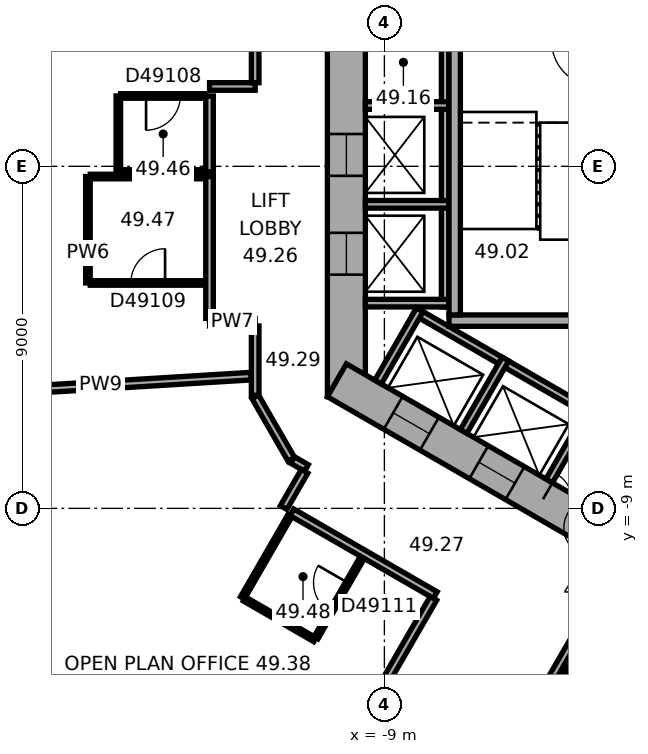
"""IFC4 building model, lengths in metres.
Left out: names, types, materials, properties, quantities, classifications, styles, units other than length and angle.
Written with IfcOpenShell. Run it as: python <this file> out.ifc"""

import sys

from ifc_helpers import new_model, si_unit, direction, frame, frame_2d, origin, place, context, subcontext, project, spatial, rectangle, extrude, element, fill, save


model = new_model("IFC4")
c1 = context("Model", 3, precision=1e-05, world=origin(), true_north=direction((0.0, 1.0)))
c2 = subcontext(c1, "Body", "Model", "MODEL_VIEW")
j1 = project(units=[si_unit("LENGTHUNIT", "METRE"), si_unit("PLANEANGLEUNIT", "RADIAN")], contexts=[c1])
p1 = place(None, origin())
s1 = spatial("IfcSite", under=j1, at=p1, CompositionType="ELEMENT")
p2 = place(p1, origin())
s2 = spatial("IfcBuilding", under=s1, at=p2, CompositionType="ELEMENT")
p3 = place(p2, frame((0.0, 0.0, 198.4)))
s3 = spatial("IfcBuildingStorey", under=s2, at=p3, CompositionType="ELEMENT", Elevation=198.4)
p4 = place(p3, frame((-10.0, 6.062, 0.0), z_axis=(0.0, 0.0, 1.0), x_axis=(0.0, -1.0, 0.0)))
e1 = element("IfcWall", 1, at=p4, inside=s3, PredefinedType="SHEAR", context=c2, shape_type="SweptSolid", body=[
    extrude(rectangle(XDim=12.125, YDim=1.0, at=frame_2d((6.062, 0.0))), origin(), (0.0, 0.0, 1.0), 3.7),
])
p5 = place(p4, frame((5.212, 0.0, 0.0)))
e2 = element("IfcOpeningElement", 2, at=p5, cuts=e1, PredefinedType="OPENING", context=c2, shape_type="SweptSolid", body=[
    extrude(rectangle(XDim=1.1, YDim=2.1, at=frame_2d((0.55, 1.05))), frame((0.0, 0.51, 0.0), z_axis=(0.0, -1.0, 0.0), x_axis=(1.0, 0.0, 0.0)), (0.0, 0.0, 1.0), 1.02),
])
p6 = place(p4, frame((7.812, 0.0, 0.0)))
e3 = element("IfcOpeningElement", 3, at=p6, cuts=e1, PredefinedType="OPENING", context=c2, shape_type="SweptSolid", body=[
    extrude(rectangle(XDim=1.1, YDim=2.1, at=frame_2d((0.55, 1.05))), frame((0.0, 0.51, 0.0), z_axis=(0.0, -1.0, 0.0), x_axis=(1.0, 0.0, 0.0)), (0.0, 0.0, 1.0), 1.02),
])
p7 = place(p3, frame((-10.25, -5.629, 0.0), z_axis=(0.0, 0.0, 1.0), x_axis=(0.866022616891, -0.50000482701, 0.0)))
e4 = element("IfcWall", 4, at=p7, inside=s3, PredefinedType="SHEAR", context=c2, shape_type="SweptSolid", body=[
    extrude(rectangle(XDim=12.125, YDim=1.0, at=frame_2d((6.062, 0.0))), origin(), (0.0, 0.0, 1.0), 3.7),
])
p8 = place(p7, frame((6.262, 0.0, 0.0)))
e5 = element("IfcOpeningElement", 5, at=p8, cuts=e4, PredefinedType="OPENING", context=c2, shape_type="SweptSolid", body=[
    extrude(rectangle(XDim=1.5, YDim=2.1, at=frame_2d((0.75, 1.05))), frame((0.0, 0.51, 0.0), z_axis=(0.0, -1.0, 0.0), x_axis=(1.0, 0.0, 0.0)), (0.0, 0.0, 1.0), 1.02),
])
p9 = place(p7, frame((1.712, 0.0, 0.0)))
e6 = element("IfcOpeningElement", 6, at=p9, cuts=e4, PredefinedType="OPENING", context=c2, shape_type="SweptSolid", body=[
    extrude(rectangle(XDim=1.1, YDim=2.1, at=frame_2d((0.55, 1.05))), frame((0.0, 0.51, 0.0), z_axis=(0.0, -1.0, 0.0), x_axis=(1.0, 0.0, 0.0)), (0.0, 0.0, 1.0), 1.02),
])
p10 = place(p7, frame((4.312, 0.0, 0.0)))
e7 = element("IfcOpeningElement", 7, at=p10, cuts=e4, PredefinedType="OPENING", context=c2, shape_type="SweptSolid", body=[
    extrude(rectangle(XDim=1.1, YDim=2.1, at=frame_2d((0.55, 1.05))), frame((0.0, 0.51, 0.0), z_axis=(0.0, -1.0, 0.0), x_axis=(1.0, 0.0, 0.0)), (0.0, 0.0, 1.0), 1.02),
])
p11 = place(p3, frame((-7.4, 4.3, 0.0), z_axis=(0.0, 0.0, 1.0), x_axis=(0.0, -1.0, 0.0)))
e8 = element("IfcWall", 8, at=p11, inside=s3, PredefinedType="PARTITIONING", context=c2, shape_type="SweptSolid", body=[
    extrude(rectangle(XDim=8.0, YDim=0.2, at=frame_2d((4.0, 0.0))), origin(), (0.0, 0.0, 1.0), 3.42),
])
for number, where, z_axis, x_axis in (
    (9, (-7.3, 1.6, 0.0), (0.0, 0.0, 1.0), (-1.0, 0.0, 0.0)),
    (10, (-7.3, -1.0, 0.0), (0.0, 0.0, 1.0), (-1.0, 0.0, 0.0)),
    (11, (-7.3, -3.6, 0.0), (0.0, 0.0, 1.0), (-1.0, 0.0, 0.0)),
):
    element("IfcWall", number, at=place(p3, frame(where, z_axis=z_axis, x_axis=x_axis)), inside=s3, PredefinedType="PARTITIONING", context=c2, shape_type="SweptSolid", body=[
        extrude(rectangle(XDim=2.2, YDim=0.2, at=frame_2d((1.1, 0.0))), origin(), (0.0, 0.0, 1.0), 3.42),
    ])
p12 = place(p3, frame((-8.203, -3.809, 0.0), z_axis=(0.0, 0.0, 1.0), x_axis=(0.866028230842, -0.499995103361, 0.0)))
e12 = element("IfcWall", 12, at=p12, inside=s3, PredefinedType="PARTITIONING", context=c2, shape_type="SweptSolid", body=[
    extrude(rectangle(XDim=5.4, YDim=0.2, at=frame_2d((2.7, 0.0))), origin(), (0.0, 0.0, 1.0), 3.42),
])
for number, where, z_axis, x_axis in (
    (13, (-8.067, -3.772, 0.0), (0.0, 0.0, 1.0), (-0.5, -0.866, 0.0)),
    (14, (-5.815, -5.072, 0.0), (0.0, 0.0, 1.0), (-0.5, -0.866, 0.0)),
):
    element("IfcWall", number, at=place(p3, frame(where, z_axis=z_axis, x_axis=x_axis)), inside=s3, PredefinedType="PARTITIONING", context=c2, shape_type="SweptSolid", body=[
        extrude(rectangle(XDim=2.2, YDim=0.2, at=frame_2d((1.1, 0.0))), origin(), (0.0, 0.0, 1.0), 3.42),
    ])
p13 = place(p3, frame((-3.563, -6.372, 0.0), z_axis=(0.0, 0.0, 1.0), x_axis=(-0.499994660107, -0.866028486751, 0.0)))
e15 = element("IfcWall", 15, at=p13, inside=s3, PredefinedType="PARTITIONING", context=c2, shape_type="SweptSolid", body=[
    extrude(rectangle(XDim=2.2, YDim=0.2, at=frame_2d((1.1, 0.0))), origin(), (0.0, 0.0, 1.0), 3.42),
])
p14 = place(p3, frame((-2.6, -4.06, 0.0), z_axis=(0.0, 0.0, 1.0), x_axis=(-1.0, 0.0, 0.0)))
e16 = element("IfcWall", 16, at=p14, inside=s3, PredefinedType="SHEAR", context=c2, shape_type="SweptSolid", body=[
    extrude(rectangle(XDim=4.7, YDim=0.3, at=frame_2d((2.35, 0.0))), origin(), (0.0, 0.0, 1.0), 3.42),
])
p15 = place(p3, frame((-7.15, 3.15, 0.0), z_axis=(0.0, 0.0, 1.0), x_axis=(0.0, -1.0, 0.0)))
e17 = element("IfcWall", 17, at=p15, inside=s3, PredefinedType="SHEAR", context=c2, shape_type="SweptSolid", body=[
    extrude(rectangle(XDim=7.06, YDim=0.3, at=frame_2d((3.53, 0.0))), origin(), (0.0, 0.0, 1.0), 3.42),
])
p16 = place(p3, frame((-20.421, -6.005, 0.0), z_axis=(0.0, 0.0, 1.0), x_axis=(0.998134865741, 0.061047438866, 0.0)))
e18 = element("IfcWall", 18, at=p16, inside=s3, PredefinedType="PARTITIONING", context=c2, shape_type="SweptSolid", body=[
    extrude(rectangle(XDim=7.927, YDim=0.2, at=frame_2d((3.963, 0.0))), origin(), (0.0, 0.0, 1.0), 2.87),
])
p17 = place(p3, frame((-16.801, -3.069, 0.0), z_axis=(0.0, 0.0, 1.0), x_axis=(0.0, 1.0, 0.0)))
e19 = element("IfcWall", 19, at=p17, inside=s3, PredefinedType="PARTITIONING", context=c2, shape_type="SweptSolid", body=[
    extrude(rectangle(XDim=2.8, YDim=0.12, at=frame_2d((1.4, 0.0))), origin(), (0.0, 0.0, 1.0), 3.42),
])
p18 = place(p3, frame((-16.741, -0.269, 0.0), z_axis=(0.0, 0.0, 1.0), x_axis=(1.0, 0.0, 0.0)))
e20 = element("IfcWall", 20, at=p18, inside=s3, PredefinedType="PARTITIONING", context=c2, shape_type="SweptSolid", body=[
    extrude(rectangle(XDim=3.04, YDim=0.12, at=frame_2d((1.52, 0.0))), origin(), (0.0, 0.0, 1.0), 3.42),
])
p19 = place(p3, frame((-16.001, -0.149, 0.0), z_axis=(0.0, 0.0, 1.0), x_axis=(0.0, 1.0, 0.0)))
e21 = element("IfcWall", 21, at=p19, inside=s3, PredefinedType="PARTITIONING", context=c2, shape_type="SweptSolid", body=[
    extrude(rectangle(XDim=2.0, YDim=0.12, at=frame_2d((1.0, 0.0))), origin(), (0.0, 0.0, 1.0), 3.42),
])
p20 = place(p3, frame((-15.941, 1.851, 0.0), z_axis=(0.0, 0.0, 1.0), x_axis=(1.0, 0.0, 0.0)))
e22 = element("IfcWall", 22, at=p20, inside=s3, PredefinedType="PARTITIONING", context=c2, shape_type="SweptSolid", body=[
    extrude(rectangle(XDim=2.24, YDim=0.12, at=frame_2d((1.12, 0.0))), origin(), (0.0, 0.0, 1.0), 3.42),
])
p21 = place(p20, frame((0.67, 0.0, 0.0)))
e23 = element("IfcOpeningElement", 23, at=p21, cuts=e22, PredefinedType="OPENING", context=c2, shape_type="SweptSolid", body=[
    extrude(rectangle(XDim=0.9, YDim=2.1, at=frame_2d((0.45, 1.05))), frame((0.0, 0.07, 0.0), z_axis=(0.0, -1.0, 0.0), x_axis=(1.0, 0.0, 0.0)), (0.0, 0.0, 1.0), 0.14),
])
p22 = place(p3, frame((-13.701, -3.069, 0.0), z_axis=(0.0, 0.0, 1.0), x_axis=(-1.0, 0.0, 0.0)))
e24 = element("IfcWall", 24, at=p22, inside=s3, PredefinedType="PARTITIONING", context=c2, shape_type="SweptSolid", body=[
    extrude(rectangle(XDim=3.04, YDim=0.12, at=frame_2d((1.52, 0.0))), origin(), (0.0, 0.0, 1.0), 3.42),
])
p23 = place(p22, frame((1.07, 0.0, 0.0)))
e25 = element("IfcOpeningElement", 25, at=p23, cuts=e24, PredefinedType="OPENING", context=c2, shape_type="SweptSolid", body=[
    extrude(rectangle(XDim=0.9, YDim=2.1, at=frame_2d((0.45, 1.05))), frame((0.0, 0.07, 0.0), z_axis=(0.0, -1.0, 0.0), x_axis=(1.0, 0.0, 0.0)), (0.0, 0.0, 1.0), 0.14),
])
p24 = place(p3, frame((-13.701, -0.149, 0.0), z_axis=(0.0, 0.0, 1.0), x_axis=(-1.0, 0.0, 0.0)))
e26 = element("IfcWall", 26, at=p24, inside=s3, PredefinedType="PARTITIONING", context=c2, shape_type="SweptSolid", body=[
    extrude(rectangle(XDim=2.24, YDim=0.12, at=frame_2d((1.12, 0.0))), origin(), (0.0, 0.0, 1.0), 3.42),
])
p25 = place(p3, frame((-13.601, -4.101, 0.0), z_axis=(0.0, 0.0, 1.0), x_axis=(1.0, 0.0, 0.0)))
e27 = element("IfcWall", 27, at=p25, inside=s3, PredefinedType="PARTITIONING", context=c2, shape_type="SweptSolid", body=[
    extrude(rectangle(XDim=1.201, YDim=0.2, at=frame_2d((0.601, 0.0))), origin(), (0.0, 0.0, 1.0), 3.42),
])
p26 = place(p3, frame((-13.601, -0.269, 0.0), z_axis=(0.0, 0.0, 1.0), x_axis=(0.0, -1.0, 0.0)))
e28 = element("IfcWall", 28, at=p26, inside=s3, PredefinedType="PARTITIONING", context=c2, shape_type="SweptSolid", body=[
    extrude(rectangle(XDim=3.732, YDim=0.2, at=frame_2d((1.866, 0.0))), origin(), (0.0, 0.0, 1.0), 3.42),
])
p27 = place(p3, frame((-13.601, 1.851, 0.0), z_axis=(0.0, 0.0, 1.0), x_axis=(0.0, -1.0, 0.0)))
e29 = element("IfcWall", 29, at=p27, inside=s3, PredefinedType="PARTITIONING", context=c2, shape_type="SweptSolid", body=[
    extrude(rectangle(XDim=2.0, YDim=0.2, at=frame_2d((1.0, 0.0))), origin(), (0.0, 0.0, 1.0), 3.42),
])
p28 = place(p3, frame((-12.735, -11.355, 0.0), z_axis=(0.0, 0.0, 1.0), x_axis=(0.500004234368, 0.866022959057, 0.0)))
e30 = element("IfcWall", 30, at=p28, inside=s3, PredefinedType="PARTITIONING", context=c2, shape_type="SweptSolid", body=[
    extrude(rectangle(XDim=2.5, YDim=0.12, at=frame_2d((1.25, 0.0))), origin(), (0.0, 0.0, 1.0), 3.42),
])
p29 = place(p3, frame((-12.4, -6.062, 0.0), z_axis=(0.0, 0.0, 1.0), x_axis=(0.500022797313, -0.86601224135, 0.0)))
e31 = element("IfcWall", 31, at=p29, inside=s3, PredefinedType="PARTITIONING", context=c2, shape_type="SweptSolid", body=[
    extrude(rectangle(XDim=1.9, YDim=0.2, at=frame_2d((0.95, 0.0))), origin(), (0.0, 0.0, 1.0), 3.42),
])
p30 = place(p3, frame((-12.4, -4.201, 0.0), z_axis=(0.0, 0.0, 1.0), x_axis=(0.0, -1.0, 0.0)))
e32 = element("IfcWall", 32, at=p30, inside=s3, PredefinedType="PARTITIONING", context=c2, shape_type="SweptSolid", body=[
    extrude(rectangle(XDim=1.821, YDim=0.2, at=frame_2d((0.911, 0.0))), origin(), (0.0, 0.0, 1.0), 3.42),
])
p31 = place(p3, frame((-12.4, 2.101, 0.0), z_axis=(0.0, 0.0, 1.0), x_axis=(-1.0, 0.0, 0.0)))
e33 = element("IfcWall", 33, at=p31, inside=s3, PredefinedType="PARTITIONING", context=c2, shape_type="SweptSolid", body=[
    extrude(rectangle(XDim=1.201, YDim=0.2, at=frame_2d((0.601, 0.0))), origin(), (0.0, 0.0, 1.0), 3.42),
])
p32 = place(p3, frame((-12.4, 6.062, 0.0), z_axis=(0.0, 0.0, 1.0), x_axis=(0.0, -1.0, 0.0)))
e34 = element("IfcWall", 34, at=p32, inside=s3, PredefinedType="PARTITIONING", context=c2, shape_type="SweptSolid", body=[
    extrude(rectangle(XDim=3.861, YDim=0.2, at=frame_2d((1.931, 0.0))), origin(), (0.0, 0.0, 1.0), 3.42),
])
p33 = place(p3, frame((-11.435, -9.103, 0.0), z_axis=(0.0, 0.0, 1.0), x_axis=(0.866007399799, -0.500031182522, 0.0)))
e35 = element("IfcWall", 35, at=p33, inside=s3, PredefinedType="PARTITIONING", context=c2, shape_type="SweptSolid", body=[
    extrude(rectangle(XDim=4.358, YDim=0.2, at=frame_2d((2.179, 0.0))), origin(), (0.0, 0.0, 1.0), 3.42),
])
p34 = place(p3, frame((-11.415, -7.728, 0.0), z_axis=(0.0, 0.0, 1.0), x_axis=(0.865915281873, -0.500190688257, 0.0)))
e36 = element("IfcWall", 36, at=p34, inside=s3, PredefinedType="PARTITIONING", context=c2, shape_type="SweptSolid", body=[
    extrude(rectangle(XDim=0.421, YDim=0.2, at=frame_2d((0.21, 0.0))), origin(), (0.0, 0.0, 1.0), 3.42),
])
p35 = place(p3, frame((-11.235, -17.474, 0.0), z_axis=(0.0, 0.0, 1.0), x_axis=(0.500009260695, 0.866020057054, 0.0)))
e37 = element("IfcWall", 37, at=p35, inside=s3, PredefinedType="PARTITIONING", context=c2, shape_type="SweptSolid", body=[
    extrude(rectangle(XDim=7.049, YDim=0.2, at=frame_2d((3.524, 0.0))), origin(), (0.0, 0.0, 1.0), 2.87),
])
p36 = place(p35, frame((3.024, 0.0, 0.0)))
e38 = element("IfcOpeningElement", 38, at=p36, cuts=e37, PredefinedType="OPENING", context=c2, shape_type="SweptSolid", body=[
    extrude(rectangle(XDim=1.0, YDim=2.1, at=frame_2d((0.5, 1.05))), frame((0.0, 0.11, 0.0), z_axis=(0.0, -1.0, 0.0), x_axis=(1.0, 0.0, 0.0)), (0.0, 0.0, 1.0), 0.22),
])
p37 = place(p3, frame((-11.101, -8.025, 0.0), z_axis=(0.0, 0.0, 1.0), x_axis=(-0.500074377092, -0.865982457891, 0.0)))
e39 = element("IfcWall", 39, at=p37, inside=s3, PredefinedType="PARTITIONING", context=c2, shape_type="SweptSolid", body=[
    extrude(rectangle(XDim=1.101, YDim=0.2, at=frame_2d((0.55, 0.0))), origin(), (0.0, 0.0, 1.0), 3.42),
])
p38 = place(p3, frame((-10.829, -12.455, 0.0), z_axis=(0.0, 0.0, 1.0), x_axis=(-0.86600889856, 0.500028586798, 0.0)))
e40 = element("IfcWall", 40, at=p38, inside=s3, PredefinedType="PARTITIONING", context=c2, shape_type="SweptSolid", body=[
    extrude(rectangle(XDim=2.14, YDim=0.12, at=frame_2d((1.07, 0.0))), origin(), (0.0, 0.0, 1.0), 3.42),
])
p39 = place(p3, frame((-9.579, -10.29, 0.0), z_axis=(0.0, 0.0, 1.0), x_axis=(-0.499959183527, -0.866048967903, 0.0)))
e41 = element("IfcWall", 41, at=p39, inside=s3, PredefinedType="PARTITIONING", context=c2, shape_type="SweptSolid", body=[
    extrude(rectangle(XDim=2.44, YDim=0.12, at=frame_2d((1.22, 0.0))), origin(), (0.0, 0.0, 1.0), 3.42),
])
p40 = place(p39, frame((0.77, 0.0, 0.0)))
e42 = element("IfcOpeningElement", 42, at=p40, cuts=e41, PredefinedType="OPENING", context=c2, shape_type="SweptSolid", body=[
    extrude(rectangle(XDim=0.9, YDim=2.1, at=frame_2d((0.45, 1.05))), frame((0.0, 0.07, 0.0), z_axis=(0.0, -1.0, 0.0), x_axis=(1.0, 0.0, 0.0)), (0.0, 0.0, 1.0), 0.14),
])
p41 = place(p3, frame((-7.984, -19.351, 0.0), z_axis=(0.0, 0.0, 1.0), x_axis=(0.500010139422, 0.866019549707, 0.0)))
e43 = element("IfcWall", 43, at=p41, inside=s3, PredefinedType="PARTITIONING", context=c2, shape_type="SweptSolid", body=[
    extrude(rectangle(XDim=8.35, YDim=0.2, at=frame_2d((4.175, 0.0))), origin(), (0.0, 0.0, 1.0), 3.42),
])
p42 = place(p41, frame((3.675, 0.0, 0.0)))
e44 = element("IfcOpeningElement", 44, at=p42, cuts=e43, PredefinedType="OPENING", context=c2, shape_type="SweptSolid", body=[
    extrude(rectangle(XDim=1.0, YDim=2.1, at=frame_2d((0.5, 1.05))), frame((0.0, 0.11, 0.0), z_axis=(0.0, -1.0, 0.0), x_axis=(1.0, 0.0, 0.0)), (0.0, 0.0, 1.0), 0.22),
])
p43 = place(p3, frame((-4.892, -14.496, 0.0), z_axis=(0.0, 0.0, 1.0), x_axis=(0.500004234368, 0.866022959057, 0.0)))
e45 = element("IfcWall", 45, at=p43, inside=s3, PredefinedType="PARTITIONING", context=c2, shape_type="SweptSolid", body=[
    extrude(rectangle(XDim=2.5, YDim=0.12, at=frame_2d((1.25, 0.0))), origin(), (0.0, 0.0, 1.0), 3.42),
])
p44 = place(p8, origin())
e46 = element("IfcDoor", 46, at=p44, inside=s3, OperationType="DOUBLE_DOOR_SINGLE_SWING", PredefinedType="DOOR", context=c2, shape_type="SweptSolid", body=[
    extrude(rectangle(XDim=1.5, YDim=2.1, at=frame_2d((0.75, 1.05))), frame((0.0, 0.025, 0.0), z_axis=(0.0, -1.0, 0.0), x_axis=(1.0, 0.0, 0.0)), (0.0, 0.0, 1.0), 0.05),
])
fill(e5, e46)
p45 = place(p5, origin())
e47 = element("IfcDoor", 47, at=p45, inside=s3, OperationType="DOUBLE_DOOR_SLIDING", PredefinedType="DOOR", context=c2, shape_type="SweptSolid", body=[
    extrude(rectangle(XDim=1.1, YDim=2.1, at=frame_2d((0.55, 1.05))), frame((0.0, 0.025, 0.0), z_axis=(0.0, -1.0, 0.0), x_axis=(1.0, 0.0, 0.0)), (0.0, 0.0, 1.0), 0.05),
])
fill(e2, e47)
p46 = place(p6, origin())
e48 = element("IfcDoor", 48, at=p46, inside=s3, OperationType="DOUBLE_DOOR_SLIDING", PredefinedType="DOOR", context=c2, shape_type="SweptSolid", body=[
    extrude(rectangle(XDim=1.1, YDim=2.1, at=frame_2d((0.55, 1.05))), frame((0.0, 0.025, 0.0), z_axis=(0.0, -1.0, 0.0), x_axis=(1.0, 0.0, 0.0)), (0.0, 0.0, 1.0), 0.05),
])
fill(e3, e48)
p47 = place(p9, origin())
e49 = element("IfcDoor", 49, at=p47, inside=s3, OperationType="DOUBLE_DOOR_SLIDING", PredefinedType="DOOR", context=c2, shape_type="SweptSolid", body=[
    extrude(rectangle(XDim=1.1, YDim=2.1, at=frame_2d((0.55, 1.05))), frame((0.0, 0.025, 0.0), z_axis=(0.0, -1.0, 0.0), x_axis=(1.0, 0.0, 0.0)), (0.0, 0.0, 1.0), 0.05),
])
fill(e6, e49)
p48 = place(p10, origin())
e50 = element("IfcDoor", 50, at=p48, inside=s3, OperationType="DOUBLE_DOOR_SLIDING", PredefinedType="DOOR", context=c2, shape_type="SweptSolid", body=[
    extrude(rectangle(XDim=1.1, YDim=2.1, at=frame_2d((0.55, 1.05))), frame((0.0, 0.025, 0.0), z_axis=(0.0, -1.0, 0.0), x_axis=(1.0, 0.0, 0.0)), (0.0, 0.0, 1.0), 0.05),
])
fill(e7, e50)
p49 = place(p21, origin())
e51 = element("IfcDoor", 51, at=p49, inside=s3, OperationType="SINGLE_SWING_LEFT", PredefinedType="DOOR", context=c2, shape_type="SweptSolid", body=[
    extrude(rectangle(XDim=0.9, YDim=2.1, at=frame_2d((0.45, 1.05))), frame((0.0, 0.025, 0.0), z_axis=(0.0, -1.0, 0.0), x_axis=(1.0, 0.0, 0.0)), (0.0, 0.0, 1.0), 0.05),
])
fill(e23, e51)
p50 = place(p23, origin())
e52 = element("IfcDoor", 52, at=p50, inside=s3, OperationType="SINGLE_SWING_LEFT", PredefinedType="DOOR", context=c2, shape_type="SweptSolid", body=[
    extrude(rectangle(XDim=0.9, YDim=2.1, at=frame_2d((0.45, 1.05))), frame((0.0, 0.025, 0.0), z_axis=(0.0, -1.0, 0.0), x_axis=(1.0, 0.0, 0.0)), (0.0, 0.0, 1.0), 0.05),
])
fill(e25, e52)
p51 = place(p40, origin())
e53 = element("IfcDoor", 53, at=p51, inside=s3, OperationType="SINGLE_SWING_LEFT", PredefinedType="DOOR", context=c2, shape_type="SweptSolid", body=[
    extrude(rectangle(XDim=0.9, YDim=2.1, at=frame_2d((0.45, 1.05))), frame((0.0, 0.025, 0.0), z_axis=(0.0, -1.0, 0.0), x_axis=(1.0, 0.0, 0.0)), (0.0, 0.0, 1.0), 0.05),
])
fill(e42, e53)
save(model, sys.argv[1])
